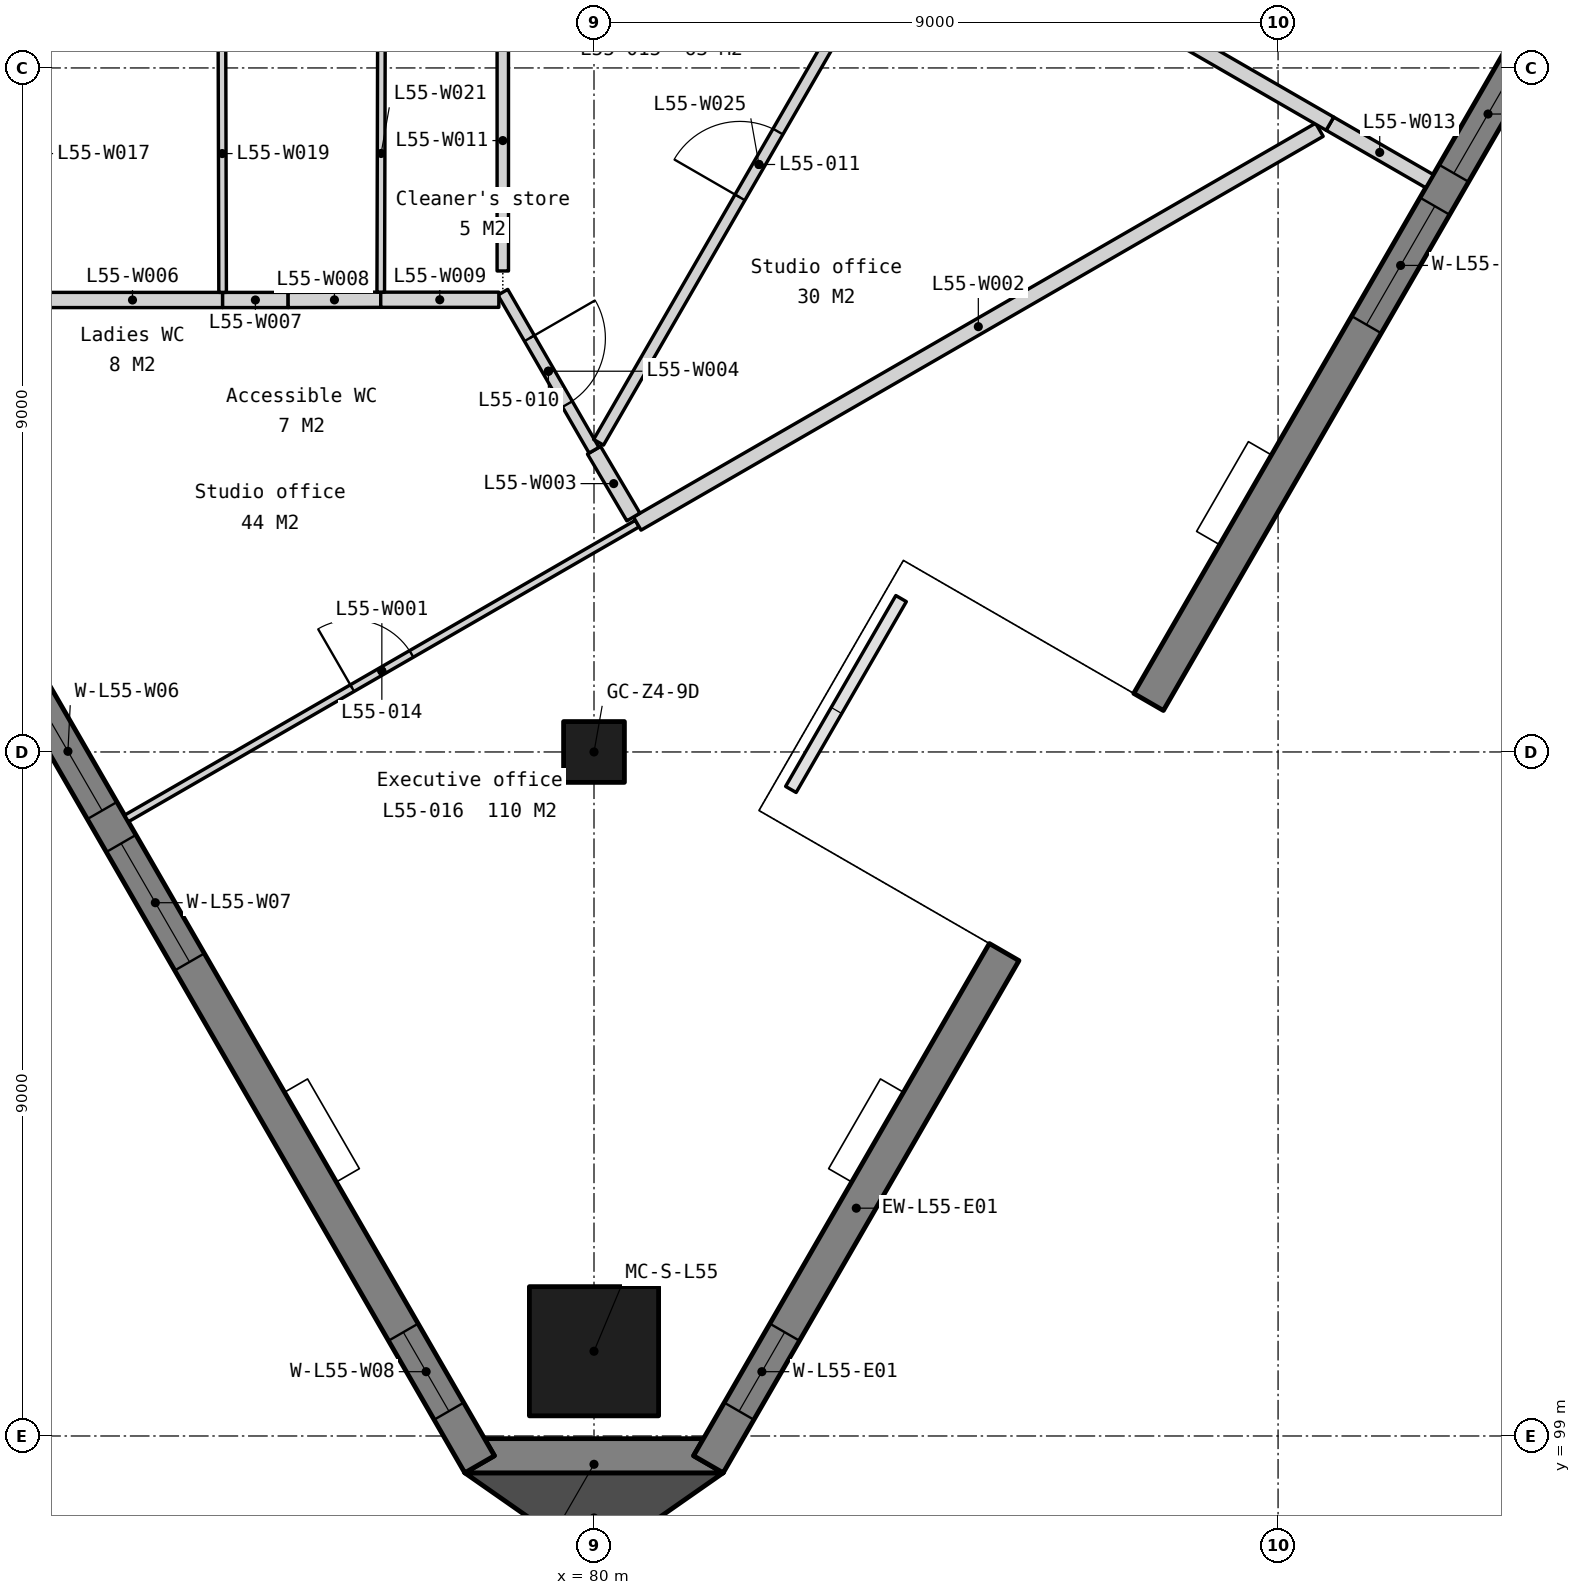
"""IFC4 building model, lengths in metres.
Left out: names, types, materials, properties, quantities, classifications, styles, units other than length and angle.
Written with IfcOpenShell. Run it as: python <this file> out.ifc"""

import sys

from ifc_helpers import new_model, si_unit, direction, frame, frame_2d, origin, origin_2d, place, context, subcontext, project, spatial, polyline, rectangle, outline, extrude, element, fill, save


model = new_model("IFC4")
c1 = context("Model", 3, precision=1e-05, world=origin(), true_north=direction((0.0, 1.0)))
c2 = subcontext(c1, "Body", "Model", "MODEL_VIEW")
j1 = project(units=[si_unit("LENGTHUNIT", "METRE"), si_unit("PLANEANGLEUNIT", "RADIAN")], contexts=[c1])
p1 = place(None, origin())
s1 = spatial("IfcSite", under=j1, at=p1, CompositionType="ELEMENT")
p2 = place(p1, origin())
s2 = spatial("IfcBuilding", under=s1, at=p2, CompositionType="ELEMENT")
p3 = place(p2, frame((0.0, 0.0, 219.2)))
s3 = spatial("IfcBuildingStorey", under=s2, at=p3, CompositionType="ELEMENT", Elevation=219.2)
p4 = place(p3, frame((80.0, 108.0, 0.0), z_axis=(0.0, 0.0, 1.0), x_axis=(1.0, 0.0, 0.0)))
e1 = element("IfcColumn", 1, at=p4, inside=s3, PredefinedType="COLUMN", context=c2, shape_type="SweptSolid", body=[
    extrude(rectangle(XDim=0.8, YDim=0.8, at=origin_2d()), origin(), (0.0, 0.0, 1.0), 3.9),
])
p5 = place(p3, frame((80.0, 100.115, 0.0), z_axis=(0.0, 0.0, 1.0), x_axis=(1.0, 0.0, 0.0)))
e2 = element("IfcColumn", 2, at=p5, inside=s3, PredefinedType="COLUMN", context=c2, shape_type="SweptSolid", body=[
    extrude(rectangle(XDim=1.7, YDim=1.7, at=origin_2d()), origin(), (0.0, 0.0, 1.0), 3.9),
])
p6 = place(p3, frame((0.0, 0.0, -0.15)))
e3 = element("IfcWall", 3, at=p6, inside=s3, PredefinedType="SOLIDWALL", context=c2, shape_type="SweptSolid", body=[
    extrude(outline(polyline([(78.3, 98.515), (78.69, 98.74), (78.56, 98.965), (81.44, 98.965), (81.31, 98.74), (81.7, 98.515), (78.3, 98.515)])), origin(), (0.0, 0.0, 1.0), 3.9),
])
p7 = place(p3, frame((59.13, 132.168, -0.15), z_axis=(0.0, 0.0, 1.0), x_axis=(0.500002199942, -0.866024133644, 0.0)))
e4 = element("IfcWall", 4, at=p7, inside=s3, PredefinedType="SOLIDWALL", context=c2, shape_type="SweptSolid", body=[
    extrude(outline(polyline([(38.729, 0.0), (38.729, 3.9), (0.0, 3.9), (0.0, 0.0), (38.729, 0.0)])), frame((0.0, 0.225, 0.0), z_axis=(0.0, -1.0, 0.0), x_axis=(1.0, 0.0, 0.0)), (0.0, 0.0, 1.0), 0.45),
])
p8 = place(p7, frame((0.807, 0.0, 0.95)))
e5 = element("IfcOpeningElement", 5, at=p8, cuts=e4, PredefinedType="OPENING", context=c2, shape_type="SweptSolid", body=[
    extrude(rectangle(XDim=1.2, YDim=2.2, at=frame_2d((0.6, 1.1))), frame((0.0, 0.235, 0.0), z_axis=(0.0, -1.0, 0.0), x_axis=(1.0, 0.0, 0.0)), (0.0, 0.0, 1.0), 0.47),
])
p9 = place(p7, frame((7.632, 0.0, 0.95)))
e6 = element("IfcOpeningElement", 6, at=p9, cuts=e4, PredefinedType="OPENING", context=c2, shape_type="SweptSolid", body=[
    extrude(rectangle(XDim=1.8, YDim=2.2, at=frame_2d((0.9, 1.1))), frame((0.0, 0.235, 0.0), z_axis=(0.0, -1.0, 0.0), x_axis=(1.0, 0.0, 0.0)), (0.0, 0.0, 1.0), 0.47),
])
p10 = place(p7, frame((9.932, 0.0, 0.95)))
e7 = element("IfcOpeningElement", 7, at=p10, cuts=e4, PredefinedType="OPENING", context=c2, shape_type="SweptSolid", body=[
    extrude(rectangle(XDim=1.8, YDim=2.2, at=frame_2d((0.9, 1.1))), frame((0.0, 0.235, 0.0), z_axis=(0.0, -1.0, 0.0), x_axis=(1.0, 0.0, 0.0)), (0.0, 0.0, 1.0), 0.47),
])
p11 = place(p7, frame((17.315, 0.0, 0.95)))
e8 = element("IfcOpeningElement", 8, at=p11, cuts=e4, PredefinedType="OPENING", context=c2, shape_type="SweptSolid", body=[
    extrude(rectangle(XDim=1.8, YDim=2.2, at=frame_2d((0.9, 1.1))), frame((0.0, 0.235, 0.0), z_axis=(0.0, -1.0, 0.0), x_axis=(1.0, 0.0, 0.0)), (0.0, 0.0, 1.0), 0.47),
])
p12 = place(p7, frame((19.615, 0.0, 0.95)))
e9 = element("IfcOpeningElement", 9, at=p12, cuts=e4, PredefinedType="OPENING", context=c2, shape_type="SweptSolid", body=[
    extrude(rectangle(XDim=1.8, YDim=2.2, at=frame_2d((0.9, 1.1))), frame((0.0, 0.235, 0.0), z_axis=(0.0, -1.0, 0.0), x_axis=(1.0, 0.0, 0.0)), (0.0, 0.0, 1.0), 0.47),
])
p13 = place(p7, frame((26.997, 0.0, 0.95)))
e10 = element("IfcOpeningElement", 10, at=p13, cuts=e4, PredefinedType="OPENING", context=c2, shape_type="SweptSolid", body=[
    extrude(rectangle(XDim=1.8, YDim=2.2, at=frame_2d((0.9, 1.1))), frame((0.0, 0.235, 0.0), z_axis=(0.0, -1.0, 0.0), x_axis=(1.0, 0.0, 0.0)), (0.0, 0.0, 1.0), 0.47),
])
p14 = place(p7, frame((29.297, 0.0, 0.95)))
e11 = element("IfcOpeningElement", 11, at=p14, cuts=e4, PredefinedType="OPENING", context=c2, shape_type="SweptSolid", body=[
    extrude(rectangle(XDim=1.8, YDim=2.2, at=frame_2d((0.9, 1.1))), frame((0.0, 0.235, 0.0), z_axis=(0.0, -1.0, 0.0), x_axis=(1.0, 0.0, 0.0)), (0.0, 0.0, 1.0), 0.47),
])
p15 = place(p7, frame((36.722, 0.0, 0.95)))
e12 = element("IfcOpeningElement", 12, at=p15, cuts=e4, PredefinedType="OPENING", context=c2, shape_type="SweptSolid", body=[
    extrude(rectangle(XDim=1.2, YDim=2.2, at=frame_2d((0.6, 1.1))), frame((0.0, 0.235, 0.0), z_axis=(0.0, -1.0, 0.0), x_axis=(1.0, 0.0, 0.0)), (0.0, 0.0, 1.0), 0.47),
])
p16 = place(p3, frame((81.505, 98.627, -0.15), z_axis=(0.0, 0.0, 1.0), x_axis=(0.499992199611, 0.866029907294, 0.0)))
e13 = element("IfcWall", 13, at=p16, inside=s3, PredefinedType="SOLIDWALL", context=c2, shape_type="SweptSolid", body=[
    extrude(outline(polyline([(0.0, 0.0), (0.0, 3.9), (7.782, 3.9), (7.782, 0.0), (0.0, 0.0)])), frame((0.0, 0.225, 0.0), z_axis=(0.0, -1.0, 0.0), x_axis=(1.0, 0.0, 0.0)), (0.0, 0.0, 1.0), 0.45),
])
p17 = place(p16, frame((0.807, 0.0, 0.95)))
e14 = element("IfcOpeningElement", 14, at=p17, cuts=e13, PredefinedType="OPENING", context=c2, shape_type="SweptSolid", body=[
    extrude(rectangle(XDim=1.2, YDim=2.2, at=frame_2d((0.6, 1.1))), frame((0.0, 0.235, 0.0), z_axis=(0.0, -1.0, 0.0), x_axis=(1.0, 0.0, 0.0)), (0.0, 0.0, 1.0), 0.47),
])
p18 = place(p3, frame((87.296, 108.658, -0.15), z_axis=(0.0, 0.0, 1.0), x_axis=(0.500003227337, 0.866023540472, 0.0)))
e15 = element("IfcWall", 15, at=p18, inside=s3, PredefinedType="SOLIDWALL", context=c2, shape_type="SweptSolid", body=[
    extrude(outline(polyline([(27.147, 3.9), (27.147, 0.0), (0.0, 0.0), (0.0, 3.9), (27.147, 3.9)])), frame((0.0, 0.225, 0.0), z_axis=(0.0, -1.0, 0.0), x_axis=(1.0, 0.0, 0.0)), (0.0, 0.0, 1.0), 0.45),
])
p19 = place(p18, frame((5.732, 0.0, 0.95)))
e16 = element("IfcOpeningElement", 16, at=p19, cuts=e15, PredefinedType="OPENING", context=c2, shape_type="SweptSolid", body=[
    extrude(rectangle(XDim=1.8, YDim=2.2, at=frame_2d((0.9, 1.1))), frame((0.0, 0.235, 0.0), z_axis=(0.0, -1.0, 0.0), x_axis=(1.0, 0.0, 0.0)), (0.0, 0.0, 1.0), 0.47),
])
p20 = place(p18, frame((8.032, 0.0, 0.95)))
e17 = element("IfcOpeningElement", 17, at=p20, cuts=e15, PredefinedType="OPENING", context=c2, shape_type="SweptSolid", body=[
    extrude(rectangle(XDim=1.8, YDim=2.2, at=frame_2d((0.9, 1.1))), frame((0.0, 0.235, 0.0), z_axis=(0.0, -1.0, 0.0), x_axis=(1.0, 0.0, 0.0)), (0.0, 0.0, 1.0), 0.47),
])
p21 = place(p18, frame((15.415, 0.0, 0.95)))
e18 = element("IfcOpeningElement", 18, at=p21, cuts=e15, PredefinedType="OPENING", context=c2, shape_type="SweptSolid", body=[
    extrude(rectangle(XDim=1.8, YDim=2.2, at=frame_2d((0.9, 1.1))), frame((0.0, 0.235, 0.0), z_axis=(0.0, -1.0, 0.0), x_axis=(1.0, 0.0, 0.0)), (0.0, 0.0, 1.0), 0.47),
])
p22 = place(p18, frame((17.715, 0.0, 0.95)))
e19 = element("IfcOpeningElement", 19, at=p22, cuts=e15, PredefinedType="OPENING", context=c2, shape_type="SweptSolid", body=[
    extrude(rectangle(XDim=1.8, YDim=2.2, at=frame_2d((0.9, 1.1))), frame((0.0, 0.235, 0.0), z_axis=(0.0, -1.0, 0.0), x_axis=(1.0, 0.0, 0.0)), (0.0, 0.0, 1.0), 0.47),
])
p23 = place(p18, frame((25.14, 0.0, 0.95)))
e20 = element("IfcOpeningElement", 20, at=p23, cuts=e15, PredefinedType="OPENING", context=c2, shape_type="SweptSolid", body=[
    extrude(rectangle(XDim=1.2, YDim=2.2, at=frame_2d((0.6, 1.1))), frame((0.0, 0.235, 0.0), z_axis=(0.0, -1.0, 0.0), x_axis=(1.0, 0.0, 0.0)), (0.0, 0.0, 1.0), 0.47),
])
p24 = place(p2, frame((0.0, 0.0, 215.3)))
s4 = spatial("IfcBuildingStorey", under=s2, at=p24, CompositionType="ELEMENT", Elevation=215.3)
for number, where, z_axis, x_axis in (
    (21, (85.704, 105.449, 0.0), (0.0, 0.0, 1.0), (-0.866, 0.5, 0.0)),
    (22, (87.379, 108.351, 0.0), (0.0, 0.0, 1.0), (-0.866, 0.5, 0.0)),
):
    element("IfcWall", number, at=place(p24, frame(where, z_axis=z_axis, x_axis=x_axis)), inside=s4, PredefinedType="SOLIDWALL", context=c2, shape_type="SweptSolid", body=[
        extrude(rectangle(XDim=3.95, YDim=0.45, at=frame_2d((1.975, 0.0))), origin(), (0.0, 0.0, 1.0), 7.65),
    ])
p25 = place(p3, frame((0.0, 0.0, -0.15)))
e23 = element("IfcWall", 23, at=p25, inside=s3, PredefinedType="SOLIDWALL", context=c2, shape_type="SweptSolid", body=[
    extrude(outline(polyline([(78.3, 98.515), (80.0, 97.328), (81.7, 98.515), (78.3, 98.515)])), origin(), (0.0, 0.0, 1.0), 3.9),
])
p26 = place(p3, frame((73.849, 107.125, 0.0), z_axis=(0.0, 0.0, 1.0), x_axis=(0.866027358884, 0.499996613652, 0.0)))
e24 = element("IfcWall", 24, at=p26, inside=s3, PredefinedType="PARTITIONING", context=c2, shape_type="SweptSolid", body=[
    extrude(rectangle(XDim=7.76, YDim=0.1, at=frame_2d((3.88, 0.0))), origin(), (0.0, 0.0, 1.0), 3.75),
])
p27 = place(p26, frame((3.43, 0.0, 0.0)))
e25 = element("IfcOpeningElement", 25, at=p27, cuts=e24, PredefinedType="OPENING", context=c2, shape_type="SweptSolid", body=[
    extrude(rectangle(XDim=0.9, YDim=2.1, at=frame_2d((0.45, 1.05))), frame((0.0, 0.06, 0.0), z_axis=(0.0, -1.0, 0.0), x_axis=(1.0, 0.0, 0.0)), (0.0, 0.0, 1.0), 0.12),
])
p28 = place(p3, frame((80.569, 111.005, 0.0), z_axis=(0.0, 0.0, 1.0), x_axis=(0.866025130863, 0.500000472714, 0.0)))
e26 = element("IfcWall", 26, at=p28, inside=s3, PredefinedType="PARTITIONING", context=c2, shape_type="SweptSolid", body=[
    extrude(rectangle(XDim=10.363, YDim=0.2, at=frame_2d((5.182, 0.0))), origin(), (0.0, 0.0, 1.0), 3.75),
])
p29 = place(p3, frame((80.0, 111.97, 0.0), z_axis=(0.0, 0.0, 1.0), x_axis=(0.507689136561, -0.861540330233, 0.0)))
e27 = element("IfcWall", 27, at=p29, inside=s3, PredefinedType="PARTITIONING", context=c2, shape_type="SweptSolid", body=[
    extrude(rectangle(XDim=1.021, YDim=0.2, at=frame_2d((0.51, 0.0))), origin(), (0.0, 0.0, 1.0), 3.75),
])
p30 = place(p3, frame((78.8, 114.049, 0.0), z_axis=(0.0, 0.0, 1.0), x_axis=(0.500001309137, -0.866024647952, 0.0)))
e28 = element("IfcWall", 28, at=p30, inside=s3, PredefinedType="PARTITIONING", context=c2, shape_type="SweptSolid", body=[
    extrude(rectangle(XDim=2.4, YDim=0.15, at=frame_2d((1.2, 0.0))), origin(), (0.0, 0.0, 1.0), 3.75),
])
p31 = place(p30, frame((0.7, 0.0, 0.0)))
e29 = element("IfcOpeningElement", 29, at=p31, cuts=e28, PredefinedType="OPENING", context=c2, shape_type="SweptSolid", body=[
    extrude(rectangle(XDim=1.0, YDim=2.1, at=frame_2d((0.5, 1.05))), frame((0.0, 0.085, 0.0), z_axis=(0.0, -1.0, 0.0), x_axis=(1.0, 0.0, 0.0)), (0.0, 0.0, 1.0), 0.17),
])
p32 = place(p3, frame((72.742, 113.947, 0.0), z_axis=(0.0, 0.0, 1.0), x_axis=(1.0, 0.0, 0.0)))
e30 = element("IfcWall", 30, at=p32, inside=s3, PredefinedType="PARTITIONING", context=c2, shape_type="SweptSolid", body=[
    extrude(rectangle(XDim=2.372, YDim=0.2, at=frame_2d((1.186, 0.0))), origin(), (0.0, 0.0, 1.0), 3.75),
])
p33 = place(p3, frame((75.114, 113.947, 0.0), z_axis=(0.0, 0.0, 1.0), x_axis=(1.0, 0.0, 0.0)))
e31 = element("IfcWall", 31, at=p33, inside=s3, PredefinedType="PARTITIONING", context=c2, shape_type="SweptSolid", body=[
    extrude(rectangle(XDim=0.862, YDim=0.2, at=frame_2d((0.431, 0.0))), origin(), (0.0, 0.0, 1.0), 3.75),
])
p34 = place(p3, frame((75.976, 113.947, 0.0), z_axis=(0.0, 0.0, 1.0), x_axis=(0.999997107299, 0.002405284684, 0.0)))
e32 = element("IfcWall", 32, at=p34, inside=s3, PredefinedType="PARTITIONING", context=c2, shape_type="SweptSolid", body=[
    extrude(rectangle(XDim=1.218, YDim=0.2, at=frame_2d((0.609, 0.0))), origin(), (0.0, 0.0, 1.0), 3.75),
])
p35 = place(p3, frame((77.194, 113.95, 0.0), z_axis=(0.0, 0.0, 1.0), x_axis=(1.0, 0.0, 0.0)))
e33 = element("IfcWall", 33, at=p35, inside=s3, PredefinedType="PARTITIONING", context=c2, shape_type="SweptSolid", body=[
    extrude(rectangle(XDim=1.554, YDim=0.2, at=frame_2d((0.777, 0.0))), origin(), (0.0, 0.0, 1.0), 3.75),
])
p36 = place(p3, frame((78.8, 114.329, 0.0), z_axis=(0.0, 0.0, 1.0), x_axis=(0.0, 1.0, 0.0)))
e34 = element("IfcWall", 34, at=p36, inside=s3, PredefinedType="PARTITIONING", context=c2, shape_type="SweptSolid", body=[
    extrude(rectangle(XDim=3.431, YDim=0.15, at=frame_2d((1.716, 0.0))), origin(), (0.0, 0.0, 1.0), 3.75),
])
p37 = place(p3, frame((89.682, 116.267, 0.0), z_axis=(0.0, 0.0, 1.0), x_axis=(0.866000172474, -0.500043699366, 0.0)))
e35 = element("IfcWall", 35, at=p37, inside=s3, PredefinedType="PARTITIONING", context=c2, shape_type="SweptSolid", body=[
    extrude(rectangle(XDim=1.513, YDim=0.2, at=frame_2d((0.756, 0.0))), origin(), (0.0, 0.0, 1.0), 3.75),
])
p38 = place(p3, frame((84.346, 119.348, 0.0), z_axis=(0.0, 0.0, 1.0), x_axis=(0.866037793621, -0.49997853956, 0.0)))
e36 = element("IfcWall", 36, at=p38, inside=s3, PredefinedType="PARTITIONING", context=c2, shape_type="SweptSolid", body=[
    extrude(rectangle(XDim=6.162, YDim=0.2, at=frame_2d((3.081, 0.0))), origin(), (0.0, 0.0, 1.0), 3.75),
])
p39 = place(p3, frame((75.114, 114.047, 0.0), z_axis=(0.0, 0.0, 1.0), x_axis=(-0.00260659454, 0.999996602827, 0.0)))
e37 = element("IfcWall", 37, at=p39, inside=s3, PredefinedType="PARTITIONING", context=c2, shape_type="SweptSolid", body=[
    extrude(rectangle(XDim=3.653, YDim=0.1, at=frame_2d((1.826, 0.0))), origin(), (0.0, 0.0, 1.0), 3.75),
])
p40 = place(p3, frame((77.194, 114.05, 0.0), z_axis=(0.0, 0.0, 1.0), x_axis=(0.002608686776, 0.999996597371, 0.0)))
e38 = element("IfcWall", 38, at=p40, inside=s3, PredefinedType="PARTITIONING", context=c2, shape_type="SweptSolid", body=[
    extrude(rectangle(XDim=3.65, YDim=0.1, at=frame_2d((1.825, 0.0))), origin(), (0.0, 0.0, 1.0), 3.75),
])
p41 = place(p3, frame((80.06, 112.074, 0.0), z_axis=(0.0, 0.0, 1.0), x_axis=(0.500005339912, 0.866022320763, 0.0)))
e39 = element("IfcWall", 39, at=p41, inside=s3, PredefinedType="PARTITIONING", context=c2, shape_type="SweptSolid", body=[
    extrude(rectangle(XDim=8.442, YDim=0.15, at=frame_2d((4.221, 0.0))), origin(), (0.0, 0.0, 1.0), 3.75),
])
p42 = place(p41, frame((3.721, 0.0, 0.0)))
e40 = element("IfcOpeningElement", 40, at=p42, cuts=e39, PredefinedType="OPENING", context=c2, shape_type="SweptSolid", body=[
    extrude(rectangle(XDim=1.0, YDim=2.1, at=frame_2d((0.5, 1.05))), frame((0.0, 0.085, 0.0), z_axis=(0.0, -1.0, 0.0), x_axis=(1.0, 0.0, 0.0)), (0.0, 0.0, 1.0), 0.17),
])
p43 = place(p13, origin())
e41 = element("IfcWindow", 41, at=p43, inside=s3, PartitioningType="SINGLE_PANEL", PredefinedType="WINDOW", context=c2, shape_type="SweptSolid", body=[
    extrude(rectangle(XDim=1.8, YDim=2.2, at=frame_2d((0.9, 1.1))), frame((0.0, 0.03, 0.0), z_axis=(0.0, -1.0, 0.0), x_axis=(1.0, 0.0, 0.0)), (0.0, 0.0, 1.0), 0.06),
])
fill(e10, e41)
p44 = place(p14, origin())
e42 = element("IfcWindow", 42, at=p44, inside=s3, PartitioningType="SINGLE_PANEL", PredefinedType="WINDOW", context=c2, shape_type="SweptSolid", body=[
    extrude(rectangle(XDim=1.8, YDim=2.2, at=frame_2d((0.9, 1.1))), frame((0.0, 0.03, 0.0), z_axis=(0.0, -1.0, 0.0), x_axis=(1.0, 0.0, 0.0)), (0.0, 0.0, 1.0), 0.06),
])
fill(e11, e42)
p45 = place(p15, origin())
e43 = element("IfcWindow", 43, at=p45, inside=s3, PartitioningType="SINGLE_PANEL", PredefinedType="WINDOW", context=c2, shape_type="SweptSolid", body=[
    extrude(rectangle(XDim=1.2, YDim=2.2, at=frame_2d((0.6, 1.1))), frame((0.0, 0.03, 0.0), z_axis=(0.0, -1.0, 0.0), x_axis=(1.0, 0.0, 0.0)), (0.0, 0.0, 1.0), 0.06),
])
fill(e12, e43)
p46 = place(p17, origin())
e44 = element("IfcWindow", 44, at=p46, inside=s3, PartitioningType="SINGLE_PANEL", PredefinedType="WINDOW", context=c2, shape_type="SweptSolid", body=[
    extrude(rectangle(XDim=1.2, YDim=2.2, at=frame_2d((0.6, 1.1))), frame((0.0, 0.03, 0.0), z_axis=(0.0, -1.0, 0.0), x_axis=(1.0, 0.0, 0.0)), (0.0, 0.0, 1.0), 0.06),
])
fill(e14, e44)
p47 = place(p19, origin())
e45 = element("IfcWindow", 45, at=p47, inside=s3, PartitioningType="SINGLE_PANEL", PredefinedType="WINDOW", context=c2, shape_type="SweptSolid", body=[
    extrude(rectangle(XDim=1.8, YDim=2.2, at=frame_2d((0.9, 1.1))), frame((0.0, 0.03, 0.0), z_axis=(0.0, -1.0, 0.0), x_axis=(1.0, 0.0, 0.0)), (0.0, 0.0, 1.0), 0.06),
])
fill(e16, e45)
p48 = place(p20, origin())
e46 = element("IfcWindow", 46, at=p48, inside=s3, PartitioningType="SINGLE_PANEL", PredefinedType="WINDOW", context=c2, shape_type="SweptSolid", body=[
    extrude(rectangle(XDim=1.8, YDim=2.2, at=frame_2d((0.9, 1.1))), frame((0.0, 0.03, 0.0), z_axis=(0.0, -1.0, 0.0), x_axis=(1.0, 0.0, 0.0)), (0.0, 0.0, 1.0), 0.06),
])
fill(e17, e46)
p49 = place(p31, origin())
e47 = element("IfcDoor", 47, at=p49, inside=s3, OperationType="SINGLE_SWING_LEFT", PredefinedType="DOOR", context=c2, shape_type="SweptSolid", body=[
    extrude(rectangle(XDim=1.0, YDim=2.1, at=frame_2d((0.5, 1.05))), frame((0.0, 0.025, 0.0), z_axis=(0.0, -1.0, 0.0), x_axis=(1.0, 0.0, 0.0)), (0.0, 0.0, 1.0), 0.05),
])
fill(e29, e47)
p50 = place(p42, origin())
e48 = element("IfcDoor", 48, at=p50, inside=s3, OperationType="SINGLE_SWING_LEFT", PredefinedType="DOOR", context=c2, shape_type="SweptSolid", body=[
    extrude(rectangle(XDim=1.0, YDim=2.1, at=frame_2d((0.5, 1.05))), frame((0.0, 0.025, 0.0), z_axis=(0.0, -1.0, 0.0), x_axis=(1.0, 0.0, 0.0)), (0.0, 0.0, 1.0), 0.05),
])
fill(e40, e48)
p51 = place(p27, origin())
e49 = element("IfcDoor", 49, at=p51, inside=s3, OperationType="SINGLE_SWING_LEFT", PredefinedType="DOOR", context=c2, shape_type="SweptSolid", body=[
    extrude(rectangle(XDim=0.9, YDim=2.1, at=frame_2d((0.45, 1.05))), frame((0.0, 0.025, 0.0), z_axis=(0.0, -1.0, 0.0), x_axis=(1.0, 0.0, 0.0)), (0.0, 0.0, 1.0), 0.05),
])
fill(e25, e49)
save(model, sys.argv[1])
